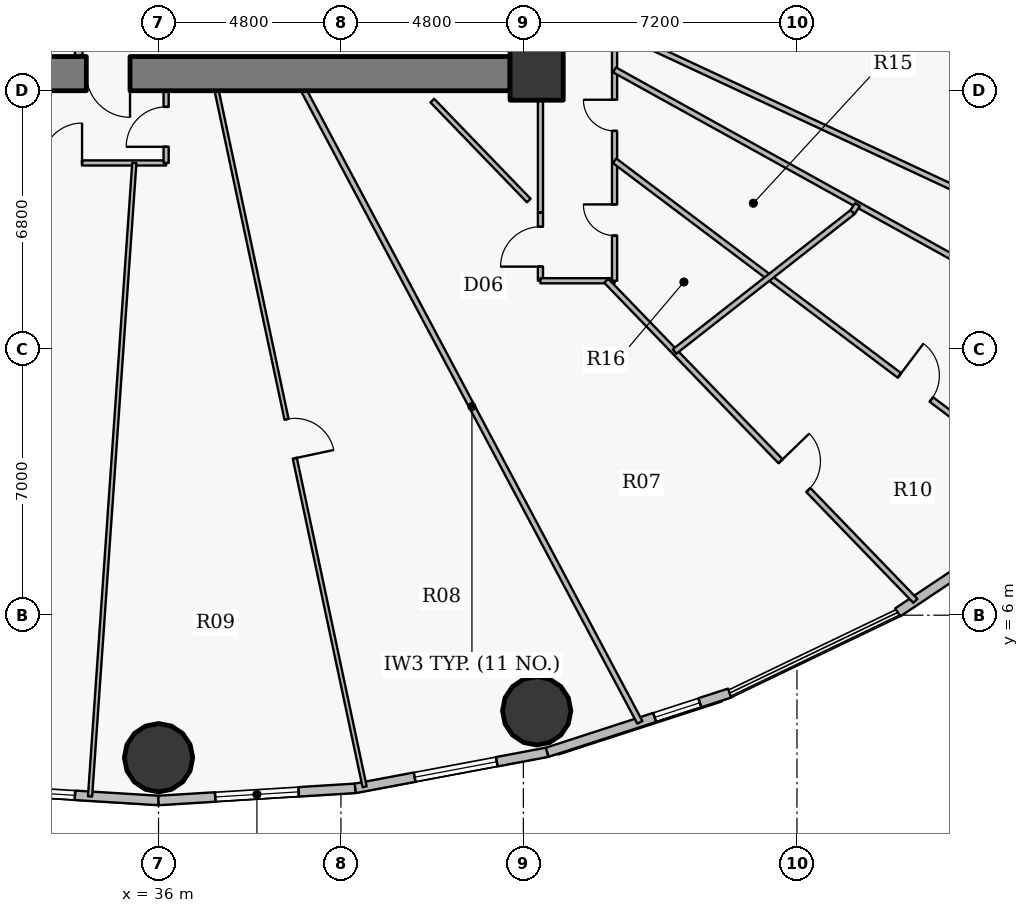
"""IFC4 building model, lengths in metres.
Left out: names, types, materials, properties, quantities, classifications, styles, units other than length and angle.
Written with IfcOpenShell. Run it as: python <this file> out.ifc"""

import sys

from ifc_helpers import new_model, si_unit, direction, frame, frame_2d, origin, origin_2d, place, context, subcontext, project, spatial, rectangle, hollow_circle, extrude, source, transform, mapped, element, fill, save


model = new_model("IFC4")
c1 = context("Model", 3, precision=1e-05, world=origin(), true_north=direction((0.0, 1.0)))
c2 = subcontext(c1, "Body", "Model", "MODEL_VIEW")
j1 = project(units=[si_unit("LENGTHUNIT", "METRE"), si_unit("PLANEANGLEUNIT", "RADIAN")], contexts=[c1])
p1 = place(None, origin())
s1 = spatial("IfcSite", under=j1, at=p1, CompositionType="ELEMENT")
p2 = place(p1, origin())
s2 = spatial("IfcBuilding", under=s1, at=p2, CompositionType="ELEMENT")
p3 = place(p2, frame((0.0, 0.0, 14.4)))
s3 = spatial("IfcBuildingStorey", under=s2, at=p3, CompositionType="ELEMENT", Elevation=14.4)
p4 = place(p3, frame((45.95, 20.25, 0.0), z_axis=(0.0, 0.0, 1.0), x_axis=(1.0, 0.0, 0.0)))
e1 = element("IfcColumn", 1, at=p4, inside=s3, PredefinedType="COLUMN", context=c2, shape_type="SweptSolid", body=[
    extrude(rectangle(XDim=1.4, YDim=1.4, at=origin_2d()), origin(), (0.0, 0.0, 1.0), 4.2),
])
p5 = place(p3, frame((45.25, 20.25, 0.0), z_axis=(0.0, 0.0, 1.0), x_axis=(-1.0, 0.0, 0.0)))
e2 = element("IfcWall", 2, at=p5, inside=s3, PredefinedType="SHEAR", context=c2, shape_type="SweptSolid", body=[
    extrude(rectangle(XDim=18.5, YDim=0.9, at=frame_2d((9.25, 0.0))), origin(), (0.0, 0.0, 1.0), 3.35),
])
p6 = place(p5, frame((10.0, 0.0, 0.0)))
e3 = element("IfcOpeningElement", 3, at=p6, cuts=e2, PredefinedType="OPENING", context=c2, shape_type="SweptSolid", body=[
    extrude(rectangle(XDim=1.15, YDim=2.15, at=origin_2d()), frame((0.575, 0.46, 1.075), z_axis=(0.0, -1.0, 0.0), x_axis=(1.0, 0.0, 0.0)), (0.0, 0.0, 1.0), 0.92),
])
for number, where, z_axis, x_axis in (
    (4, (36.0, 2.25, 0.0), (0.0, 0.0, 1.0), (1.0, 0.0, 0.0)),
    (5, (45.951, 3.484, 0.0), (0.0, 0.0, 1.0), (1.0, 0.0, 0.0)),
):
    element("IfcColumn", number, at=place(p3, frame(where, z_axis=z_axis, x_axis=x_axis)), inside=s3, PredefinedType="COLUMN", context=c2, shape_type="SweptSolid", body=[
        extrude(hollow_circle(Radius=0.9, WallThickness=0.05, at=origin_2d()), origin(), (0.0, 0.0, 1.0), 4.2),
    ])
p7 = place(p3, frame((36.0, 1.125, 0.0), z_axis=(0.0, 0.0, 1.0), x_axis=(-0.998106762298, 0.061505211614, 0.0)))
e6 = element("IfcWall", 6, at=p7, inside=s3, PredefinedType="SOLIDWALL", context=c2, shape_type="SweptSolid", body=[
    extrude(rectangle(XDim=5.188, YDim=0.25, at=frame_2d((2.594, 0.0))), origin(), (0.0, 0.0, 1.0), 3.9),
])
p8 = place(p7, frame((2.202, 0.0, 0.9)))
e7 = element("IfcOpeningElement", 7, at=p8, cuts=e6, PredefinedType="OPENING", context=c2, shape_type="SweptSolid", body=[
    extrude(rectangle(XDim=2.2, YDim=2.0, at=origin_2d()), frame((1.1, 0.135, 1.0), z_axis=(0.0, -1.0, 0.0), x_axis=(1.0, 0.0, 0.0)), (0.0, 0.0, 1.0), 0.27),
])
p9 = place(p3, frame((41.178, 1.444, 0.0), z_axis=(0.0, 0.0, 1.0), x_axis=(-0.998106762298, -0.061505211614, 0.0)))
e8 = element("IfcWall", 8, at=p9, inside=s3, PredefinedType="SOLIDWALL", context=c2, shape_type="SweptSolid", body=[
    extrude(rectangle(XDim=5.188, YDim=0.25, at=frame_2d((2.594, 0.0))), origin(), (0.0, 0.0, 1.0), 3.9),
])
p10 = place(p9, frame((1.494, 0.0, 0.9)))
e9 = element("IfcOpeningElement", 9, at=p10, cuts=e8, PredefinedType="OPENING", context=c2, shape_type="SweptSolid", body=[
    extrude(rectangle(XDim=2.2, YDim=2.0, at=origin_2d()), frame((1.1, 0.135, 1.0), z_axis=(0.0, -1.0, 0.0), x_axis=(1.0, 0.0, 0.0)), (0.0, 0.0, 1.0), 0.27),
])
p11 = place(p3, frame((46.229, 2.394, 0.0), z_axis=(0.0, 0.0, 1.0), x_axis=(-0.98278278947, -0.184764684726, 0.0)))
e10 = element("IfcWall", 10, at=p11, inside=s3, PredefinedType="SOLIDWALL", context=c2, shape_type="SweptSolid", body=[
    extrude(rectangle(XDim=5.139, YDim=0.25, at=frame_2d((2.569, 0.0))), origin(), (0.0, 0.0, 1.0), 3.9),
])
p12 = place(p11, frame((1.351, 0.0, 0.9)))
e11 = element("IfcOpeningElement", 11, at=p12, cuts=e10, PredefinedType="OPENING", context=c2, shape_type="SweptSolid", body=[
    extrude(rectangle(XDim=2.2, YDim=2.0, at=origin_2d()), frame((1.1, 0.135, 1.0), z_axis=(0.0, -1.0, 0.0), x_axis=(1.0, 0.0, 0.0)), (0.0, 0.0, 1.0), 0.27),
])
p13 = place(p3, frame((51.026, 3.95, 0.0), z_axis=(0.0, 0.0, 1.0), x_axis=(-0.951198629726, -0.308579271513, 0.0)))
e12 = element("IfcWall", 12, at=p13, inside=s3, PredefinedType="SOLIDWALL", context=c2, shape_type="SweptSolid", body=[
    extrude(rectangle(XDim=5.044, YDim=0.25, at=frame_2d((2.522, 0.0))), origin(), (0.0, 0.0, 1.0), 3.9),
])
p14 = place(p13, frame((0.822, 0.0, 0.9)))
e13 = element("IfcOpeningElement", 13, at=p14, cuts=e12, PredefinedType="OPENING", context=c2, shape_type="SweptSolid", body=[
    extrude(rectangle(XDim=1.25, YDim=1.65, at=origin_2d()), frame((0.625, 0.135, 0.825), z_axis=(0.0, -1.0, 0.0), x_axis=(1.0, 0.0, 0.0)), (0.0, 0.0, 1.0), 0.27),
])
p15 = place(p3, frame((59.399, 8.714, 0.0), z_axis=(0.0, 0.0, 1.0), x_axis=(-0.831218664812, -0.555945618985, 0.0)))
e14 = element("IfcWall", 14, at=p15, inside=s3, PredefinedType="SOLIDWALL", context=c2, shape_type="SweptSolid", body=[
    extrude(rectangle(XDim=4.748, YDim=0.25, at=frame_2d((2.374, 0.0))), origin(), (0.0, 0.0, 1.0), 3.9),
])
p16 = place(p3, frame((25.95, 17.9, 0.0), z_axis=(0.0, 0.0, 1.0), x_axis=(1.0, 0.0, 0.0)))
e15 = element("IfcWall", 15, at=p16, inside=s3, PredefinedType="PARTITIONING", context=c2, shape_type="SweptSolid", body=[
    extrude(rectangle(XDim=10.25, YDim=0.135, at=frame_2d((5.125, 0.0))), origin(), (0.0, 0.0, 1.0), 3.085),
])
p17 = place(p16, frame((2.301, 0.0, 0.0)))
e16 = element("IfcOpeningElement", 16, at=p17, cuts=e15, PredefinedType="OPENING", context=c2, shape_type="SweptSolid", body=[
    extrude(rectangle(XDim=1.05, YDim=2.15, at=origin_2d()), frame((0.525, 0.078, 1.075), z_axis=(0.0, -1.0, 0.0), x_axis=(1.0, 0.0, 0.0)), (0.0, 0.0, 1.0), 0.155),
])
p18 = place(p16, frame((6.988, 0.0, 0.0)))
e17 = element("IfcOpeningElement", 17, at=p18, cuts=e15, PredefinedType="OPENING", context=c2, shape_type="SweptSolid", body=[
    extrude(rectangle(XDim=1.05, YDim=2.15, at=origin_2d()), frame((0.525, 0.078, 1.075), z_axis=(0.0, -1.0, 0.0), x_axis=(1.0, 0.0, 0.0)), (0.0, 0.0, 1.0), 0.155),
])
p19 = place(p3, frame((33.9, 20.7, 0.0), z_axis=(0.0, 0.0, 1.0), x_axis=(0.0, 1.0, 0.0)))
e18 = element("IfcWall", 18, at=p19, inside=s3, PredefinedType="PARTITIONING", context=c2, shape_type="SweptSolid", body=[
    extrude(rectangle(XDim=11.4, YDim=0.2, at=frame_2d((5.7, 0.0))), origin(), (0.0, 0.0, 1.0), 3.485),
])
p20 = place(p3, frame((34.198, 1.231, 0.0), z_axis=(0.0, 0.0, 1.0), x_axis=(0.069766316907, 0.99756336191, 0.0)))
e19 = element("IfcWall", 19, at=p20, inside=s3, PredefinedType="MOVABLE", context=c2, shape_type="SweptSolid", body=[
    extrude(rectangle(XDim=16.71, YDim=0.11, at=frame_2d((8.355, 0.0))), origin(), (0.0, 0.0, 1.0), 3.085),
])
p21 = place(p3, frame((36.2, 17.9, 0.0), z_axis=(0.0, 0.0, 1.0), x_axis=(0.0, 1.0, 0.0)))
e20 = element("IfcWall", 20, at=p21, inside=s3, PredefinedType="PARTITIONING", context=c2, shape_type="SweptSolid", body=[
    extrude(rectangle(XDim=1.9, YDim=0.135, at=frame_2d((0.95, 0.0))), origin(), (0.0, 0.0, 1.0), 3.085),
])
p22 = place(p21, frame((0.425, 0.0, 0.0)))
e21 = element("IfcOpeningElement", 21, at=p22, cuts=e20, PredefinedType="OPENING", context=c2, shape_type="SweptSolid", body=[
    extrude(rectangle(XDim=1.05, YDim=2.15, at=origin_2d()), frame((0.525, 0.078, 1.075), z_axis=(0.0, -1.0, 0.0), x_axis=(1.0, 0.0, 0.0)), (0.0, 0.0, 1.0), 0.155),
])
p23 = place(p3, frame((37.531, 19.8, 0.0), z_axis=(0.0, 0.0, 1.0), x_axis=(0.207904603096, -0.978149107249, 0.0)))
e22 = element("IfcWall", 22, at=p23, inside=s3, PredefinedType="MOVABLE", context=c2, shape_type="SweptSolid", body=[
    extrude(rectangle(XDim=18.724, YDim=0.11, at=frame_2d((9.362, 0.0))), origin(), (0.0, 0.0, 1.0), 3.085),
])
p24 = place(p23, frame((8.837, 0.0, 0.0)))
e23 = element("IfcOpeningElement", 23, at=p24, cuts=e22, PredefinedType="OPENING", context=c2, shape_type="SweptSolid", body=[
    extrude(rectangle(XDim=1.05, YDim=2.15, at=origin_2d()), frame((0.525, 0.065, 1.075), z_axis=(0.0, -1.0, 0.0), x_axis=(1.0, 0.0, 0.0)), (0.0, 0.0, 1.0), 0.13),
])
p25 = place(p3, frame((39.828, 19.8, 0.0), z_axis=(0.0, 0.0, 1.0), x_axis=(0.469463695446, -0.882951775953, 0.0)))
e24 = element("IfcWall", 24, at=p25, inside=s3, PredefinedType="PARTITIONING", context=c2, shape_type="SweptSolid", body=[
    extrude(rectangle(XDim=18.824, YDim=0.15, at=frame_2d((9.412, 0.0))), origin(), (0.0, 0.0, 1.0), 3.085),
])
p26 = place(p3, frame((46.05, 14.8, 0.0), z_axis=(0.0, 0.0, 1.0), x_axis=(0.0, 1.0, 0.0)))
e25 = element("IfcWall", 25, at=p26, inside=s3, PredefinedType="PARTITIONING", context=c2, shape_type="SweptSolid", body=[
    extrude(rectangle(XDim=1.793, YDim=0.135, at=frame_2d((0.896, 0.0))), origin(), (0.0, 0.0, 1.0), 3.9),
])
p27 = place(p26, frame((0.372, 0.0, 0.0)))
e26 = element("IfcOpeningElement", 26, at=p27, cuts=e25, PredefinedType="OPENING", context=c2, shape_type="SweptSolid", body=[
    extrude(rectangle(XDim=1.05, YDim=2.15, at=origin_2d()), frame((0.525, 0.078, 1.075), z_axis=(0.0, -1.0, 0.0), x_axis=(1.0, 0.0, 0.0)), (0.0, 0.0, 1.0), 0.155),
])
p28 = place(p3, frame((46.05, 14.8, 0.0), z_axis=(0.0, 0.0, 1.0), x_axis=(1.0, 0.0, 0.0)))
e27 = element("IfcWall", 27, at=p28, inside=s3, PredefinedType="PARTITIONING", context=c2, shape_type="SweptSolid", body=[
    extrude(rectangle(XDim=1.95, YDim=0.135, at=frame_2d((0.975, 0.0))), origin(), (0.0, 0.0, 1.0), 3.9),
])
p29 = place(p3, frame((47.781, 14.8, 0.0), z_axis=(0.0, 0.0, 1.0), x_axis=(0.694655165544, -0.719342895275, 0.0)))
e28 = element("IfcWall", 28, at=p29, inside=s3, PredefinedType="PARTITIONING", context=c2, shape_type="SweptSolid", body=[
    extrude(rectangle(XDim=11.709, YDim=0.15, at=frame_2d((5.854, 0.0))), origin(), (0.0, 0.0, 1.0), 3.085),
])
p30 = place(p29, frame((6.603, 0.0, 0.0)))
e29 = element("IfcOpeningElement", 29, at=p30, cuts=e28, PredefinedType="OPENING", context=c2, shape_type="SweptSolid", body=[
    extrude(rectangle(XDim=1.05, YDim=2.15, at=origin_2d()), frame((0.525, 0.085, 1.075), z_axis=(0.0, -1.0, 0.0), x_axis=(1.0, 0.0, 0.0)), (0.0, 0.0, 1.0), 0.17),
])
p31 = place(p3, frame((48.0, 14.8, 0.0), z_axis=(0.0, 0.0, 1.0), x_axis=(0.0, 1.0, 0.0)))
e30 = element("IfcWall", 30, at=p31, inside=s3, PredefinedType="PARTITIONING", context=c2, shape_type="SweptSolid", body=[
    extrude(rectangle(XDim=6.2, YDim=0.135, at=frame_2d((3.1, 0.0))), origin(), (0.0, 0.0, 1.0), 3.085),
])
p32 = place(p31, frame((1.189, 0.0, 0.0)))
e31 = element("IfcOpeningElement", 31, at=p32, cuts=e30, PredefinedType="OPENING", context=c2, shape_type="SweptSolid", body=[
    extrude(rectangle(XDim=0.82, YDim=2.1, at=origin_2d()), frame((0.41, 0.078, 1.05), z_axis=(0.0, -1.0, 0.0), x_axis=(1.0, 0.0, 0.0)), (0.0, 0.0, 1.0), 0.155),
])
p33 = place(p31, frame((3.943, 0.0, 0.0)))
e32 = element("IfcOpeningElement", 32, at=p33, cuts=e30, PredefinedType="OPENING", context=c2, shape_type="SweptSolid", body=[
    extrude(rectangle(XDim=0.82, YDim=2.1, at=origin_2d()), frame((0.41, 0.078, 1.05), z_axis=(0.0, -1.0, 0.0), x_axis=(1.0, 0.0, 0.0)), (0.0, 0.0, 1.0), 0.155),
])
p34 = place(p3, frame((48.0, 17.957, 0.0), z_axis=(0.0, 0.0, 1.0), x_axis=(0.798637068648, -0.601812954814, 0.0)))
e33 = element("IfcWall", 33, at=p34, inside=s3, PredefinedType="PARTITIONING", context=c2, shape_type="SweptSolid", body=[
    extrude(rectangle(XDim=14.768, YDim=0.15, at=frame_2d((7.384, 0.0))), origin(), (0.0, 0.0, 1.0), 3.085),
])
p35 = place(p34, frame((9.388, 0.0, 0.0)))
e34 = element("IfcOpeningElement", 34, at=p35, cuts=e33, PredefinedType="OPENING", context=c2, shape_type="SweptSolid", body=[
    extrude(rectangle(XDim=1.05, YDim=2.15, at=origin_2d()), frame((0.525, 0.085, 1.075), z_axis=(0.0, -1.0, 0.0), x_axis=(1.0, 0.0, 0.0)), (0.0, 0.0, 1.0), 0.17),
])
p36 = place(p3, frame((48.0, 20.348, 0.0), z_axis=(0.0, 0.0, 1.0), x_axis=(0.874615123646, -0.484817888996, 0.0)))
e35 = element("IfcWall", 35, at=p36, inside=s3, PredefinedType="PARTITIONING", context=c2, shape_type="SweptSolid", body=[
    extrude(rectangle(XDim=17.115, YDim=0.15, at=frame_2d((8.557, 0.0))), origin(), (0.0, 0.0, 1.0), 3.085),
])
p37 = place(p36, frame((11.781, 0.0, 0.0)))
e36 = element("IfcOpeningElement", 36, at=p37, cuts=e35, PredefinedType="OPENING", context=c2, shape_type="SweptSolid", body=[
    extrude(rectangle(XDim=0.82, YDim=2.1, at=origin_2d()), frame((0.41, 0.085, 1.05), z_axis=(0.0, -1.0, 0.0), x_axis=(1.0, 0.0, 0.0)), (0.0, 0.0, 1.0), 0.17),
])
p38 = place(p3, frame((48.867, 21.0, 0.0), z_axis=(0.0, 0.0, 1.0), x_axis=(0.906305939421, -0.422622223942, 0.0)))
e37 = element("IfcWall", 37, at=p38, inside=s3, PredefinedType="PARTITIONING", context=c2, shape_type="SweptSolid", body=[
    extrude(rectangle(XDim=17.061, YDim=0.15, at=frame_2d((8.53, 0.0))), origin(), (0.0, 0.0, 1.0), 3.085),
])
p39 = place(p3, frame((49.579, 12.939, 0.0), z_axis=(0.0, 0.0, 1.0), x_axis=(0.787322308609, 0.616541630684, 0.0)))
e38 = element("IfcWall", 38, at=p39, inside=s3, PredefinedType="PARTITIONING", context=c2, shape_type="SweptSolid", body=[
    extrude(rectangle(XDim=5.951, YDim=0.15, at=frame_2d((2.976, 0.0))), origin(), (0.0, 0.0, 1.0), 3.085),
])
p40 = place(p3, frame((54.264, 16.608, 0.0), z_axis=(0.0, 0.0, 1.0), x_axis=(0.545316895374, 0.838229970604, 0.0)))
e39 = element("IfcWall", 39, at=p40, inside=s3, PredefinedType="PARTITIONING", context=c2, shape_type="SweptSolid", body=[
    extrude(rectangle(XDim=0.235, YDim=0.15, at=frame_2d((0.118, 0.0))), origin(), (0.0, 0.0, 1.0), 3.9),
])
p41 = place(p3, frame((46.05, 16.603, 0.0), z_axis=(0.0, 0.0, 1.0), x_axis=(0.0, 1.0, 0.0)))
e40 = element("IfcWall", 40, at=p41, inside=s3, PredefinedType="PARTITIONING", context=c2, shape_type="SweptSolid", body=[
    extrude(rectangle(XDim=3.197, YDim=0.135, at=frame_2d((1.599, 0.0))), origin(), (0.0, 0.0, 1.0), 3.085),
])
p42 = place(p3, frame((46.4, 19.8, 0.0), z_axis=(0.0, 0.0, 1.0), x_axis=(0.0, 1.0, 0.0)))
e41 = element("IfcWall", 41, at=p42, inside=s3, PredefinedType="PARTITIONING", context=c2, shape_type="SweptSolid", body=[
    extrude(rectangle(XDim=1.14, YDim=0.135, at=frame_2d((0.57, 0.0))), origin(), (0.0, 0.0, 1.0), 3.9),
])
p43 = place(p3, frame((43.204, 19.54, 0.0), z_axis=(0.0, 0.0, 1.0), x_axis=(0.694638628507, -0.719358864397, 0.0)))
e42 = element("IfcWall", 42, at=p43, inside=s3, PredefinedType="PARTITIONING", context=c2, shape_type="SweptSolid", body=[
    extrude(rectangle(XDim=3.654, YDim=0.135, at=frame_2d((1.827, 0.0))), origin(), (0.0, 0.0, 1.0), 3.9),
])
m1 = source(origin(), c2, "Body", "SweptSolid", [
    extrude(rectangle(XDim=2.2, YDim=2.0, at=origin_2d()), frame((1.1, 0.03, 1.0), z_axis=(0.0, -1.0, 0.0), x_axis=(1.0, 0.0, 0.0)), (0.0, 0.0, 1.0), 0.06),
])
p44 = place(p8, origin())
e43 = element("IfcWindow", 43, at=p44, inside=s3, PartitioningType="TRIPLE_PANEL_VERTICAL", PredefinedType="WINDOW", context=c2, shape_type="MappedRepresentation", body=[
    mapped(m1, transform((0.0, 0.0, 0.0), x_axis=(1.0, 0.0, 0.0), y_axis=(0.0, 1.0, 0.0), z_axis=(0.0, 0.0, 1.0), scale=1.0)),
])
fill(e7, e43)
p45 = place(p10, origin())
e44 = element("IfcWindow", 44, at=p45, inside=s3, PartitioningType="TRIPLE_PANEL_VERTICAL", PredefinedType="WINDOW", context=c2, shape_type="MappedRepresentation", body=[
    mapped(m1, transform((0.0, 0.0, 0.0), x_axis=(1.0, 0.0, 0.0), y_axis=(0.0, 1.0, 0.0), z_axis=(0.0, 0.0, 1.0), scale=1.0)),
])
fill(e9, e44)
p46 = place(p12, origin())
e45 = element("IfcWindow", 45, at=p46, inside=s3, PartitioningType="TRIPLE_PANEL_VERTICAL", PredefinedType="WINDOW", context=c2, shape_type="MappedRepresentation", body=[
    mapped(m1, transform((0.0, 0.0, 0.0), x_axis=(1.0, 0.0, 0.0), y_axis=(0.0, 1.0, 0.0), z_axis=(0.0, 0.0, 1.0), scale=1.0)),
])
fill(e11, e45)
m2 = source(origin(), c2, "Body", "SweptSolid", [
    extrude(rectangle(XDim=1.25, YDim=1.65, at=origin_2d()), frame((0.625, 0.03, 0.825), z_axis=(0.0, -1.0, 0.0), x_axis=(1.0, 0.0, 0.0)), (0.0, 0.0, 1.0), 0.06),
])
p47 = place(p14, origin())
e46 = element("IfcWindow", 46, at=p47, inside=s3, PartitioningType="SINGLE_PANEL", PredefinedType="WINDOW", context=c2, shape_type="MappedRepresentation", body=[
    mapped(m2, transform((0.0, 0.0, 0.0), x_axis=(1.0, 0.0, 0.0), y_axis=(0.0, 1.0, 0.0), z_axis=(0.0, 0.0, 1.0), scale=1.0)),
])
fill(e13, e46)
m3 = source(origin(), c2, "Body", "SweptSolid", [
    extrude(rectangle(XDim=1.15, YDim=2.15, at=origin_2d()), frame((0.575, 0.025, 1.075), z_axis=(0.0, -1.0, 0.0), x_axis=(1.0, 0.0, 0.0)), (0.0, 0.0, 1.0), 0.05),
])
p48 = place(p6, origin())
e47 = element("IfcDoor", 47, at=p48, inside=s3, OperationType="SINGLE_SWING_LEFT", PredefinedType="DOOR", context=c2, shape_type="MappedRepresentation", body=[
    mapped(m3, transform((0.0, 0.0, 0.0), x_axis=(1.0, 0.0, 0.0), y_axis=(0.0, 1.0, 0.0), z_axis=(0.0, 0.0, 1.0), scale=1.0)),
])
fill(e3, e47)
m4 = source(origin(), c2, "Body", "SweptSolid", [
    extrude(rectangle(XDim=1.05, YDim=2.15, at=origin_2d()), frame((0.525, 0.025, 1.075), z_axis=(0.0, -1.0, 0.0), x_axis=(1.0, 0.0, 0.0)), (0.0, 0.0, 1.0), 0.05),
])
p49 = place(p18, origin())
e48 = element("IfcDoor", 48, at=p49, inside=s3, OperationType="SINGLE_SWING_RIGHT", PredefinedType="DOOR", context=c2, shape_type="MappedRepresentation", body=[
    mapped(m4, transform((0.0, 0.0, 0.0), x_axis=(1.0, 0.0, 0.0), y_axis=(0.0, 1.0, 0.0), z_axis=(0.0, 0.0, 1.0), scale=1.0)),
])
fill(e17, e48)
p50 = place(p22, origin())
e49 = element("IfcDoor", 49, at=p50, inside=s3, OperationType="SINGLE_SWING_LEFT", PredefinedType="DOOR", context=c2, shape_type="MappedRepresentation", body=[
    mapped(m4, transform((0.0, 0.0, 0.0), x_axis=(1.0, 0.0, 0.0), y_axis=(0.0, 1.0, 0.0), z_axis=(0.0, 0.0, 1.0), scale=1.0)),
])
fill(e21, e49)
p51 = place(p24, origin())
e50 = element("IfcDoor", 50, at=p51, inside=s3, OperationType="SINGLE_SWING_RIGHT", PredefinedType="DOOR", context=c2, shape_type="MappedRepresentation", body=[
    mapped(m4, transform((0.0, 0.0, 0.0), x_axis=(1.0, 0.0, 0.0), y_axis=(0.0, 1.0, 0.0), z_axis=(0.0, 0.0, 1.0), scale=1.0)),
])
fill(e23, e50)
p52 = place(p27, origin())
e51 = element("IfcDoor", 51, at=p52, inside=s3, OperationType="SINGLE_SWING_LEFT", PredefinedType="DOOR", context=c2, shape_type="MappedRepresentation", body=[
    mapped(m4, transform((0.0, 0.0, 0.0), x_axis=(1.0, 0.0, 0.0), y_axis=(0.0, 1.0, 0.0), z_axis=(0.0, 0.0, 1.0), scale=1.0)),
])
fill(e26, e51)
m5 = source(origin(), c2, "Body", "SweptSolid", [
    extrude(rectangle(XDim=0.82, YDim=2.1, at=origin_2d()), frame((0.41, 0.025, 1.05), z_axis=(0.0, -1.0, 0.0), x_axis=(1.0, 0.0, 0.0)), (0.0, 0.0, 1.0), 0.05),
])
p53 = place(p32, origin())
e52 = element("IfcDoor", 52, at=p53, inside=s3, OperationType="SINGLE_SWING_RIGHT", PredefinedType="DOOR", context=c2, shape_type="MappedRepresentation", body=[
    mapped(m5, transform((0.0, 0.0, 0.0), x_axis=(1.0, 0.0, 0.0), y_axis=(0.0, 1.0, 0.0), z_axis=(0.0, 0.0, 1.0), scale=1.0)),
])
fill(e31, e52)
p54 = place(p30, origin())
e53 = element("IfcDoor", 53, at=p54, inside=s3, OperationType="SINGLE_SWING_LEFT", PredefinedType="DOOR", context=c2, shape_type="MappedRepresentation", body=[
    mapped(m4, transform((0.0, 0.0, 0.0), x_axis=(1.0, 0.0, 0.0), y_axis=(0.0, 1.0, 0.0), z_axis=(0.0, 0.0, 1.0), scale=1.0)),
])
fill(e29, e53)
p55 = place(p33, origin())
e54 = element("IfcDoor", 54, at=p55, inside=s3, OperationType="SINGLE_SWING_RIGHT", PredefinedType="DOOR", context=c2, shape_type="MappedRepresentation", body=[
    mapped(m5, transform((0.0, 0.0, 0.0), x_axis=(1.0, 0.0, 0.0), y_axis=(0.0, 1.0, 0.0), z_axis=(0.0, 0.0, 1.0), scale=1.0)),
])
fill(e32, e54)
p56 = place(p35, origin())
e55 = element("IfcDoor", 55, at=p56, inside=s3, OperationType="SINGLE_SWING_LEFT", PredefinedType="DOOR", context=c2, shape_type="MappedRepresentation", body=[
    mapped(m4, transform((0.0, 0.0, 0.0), x_axis=(1.0, 0.0, 0.0), y_axis=(0.0, 1.0, 0.0), z_axis=(0.0, 0.0, 1.0), scale=1.0)),
])
fill(e34, e55)
save(model, sys.argv[1])
